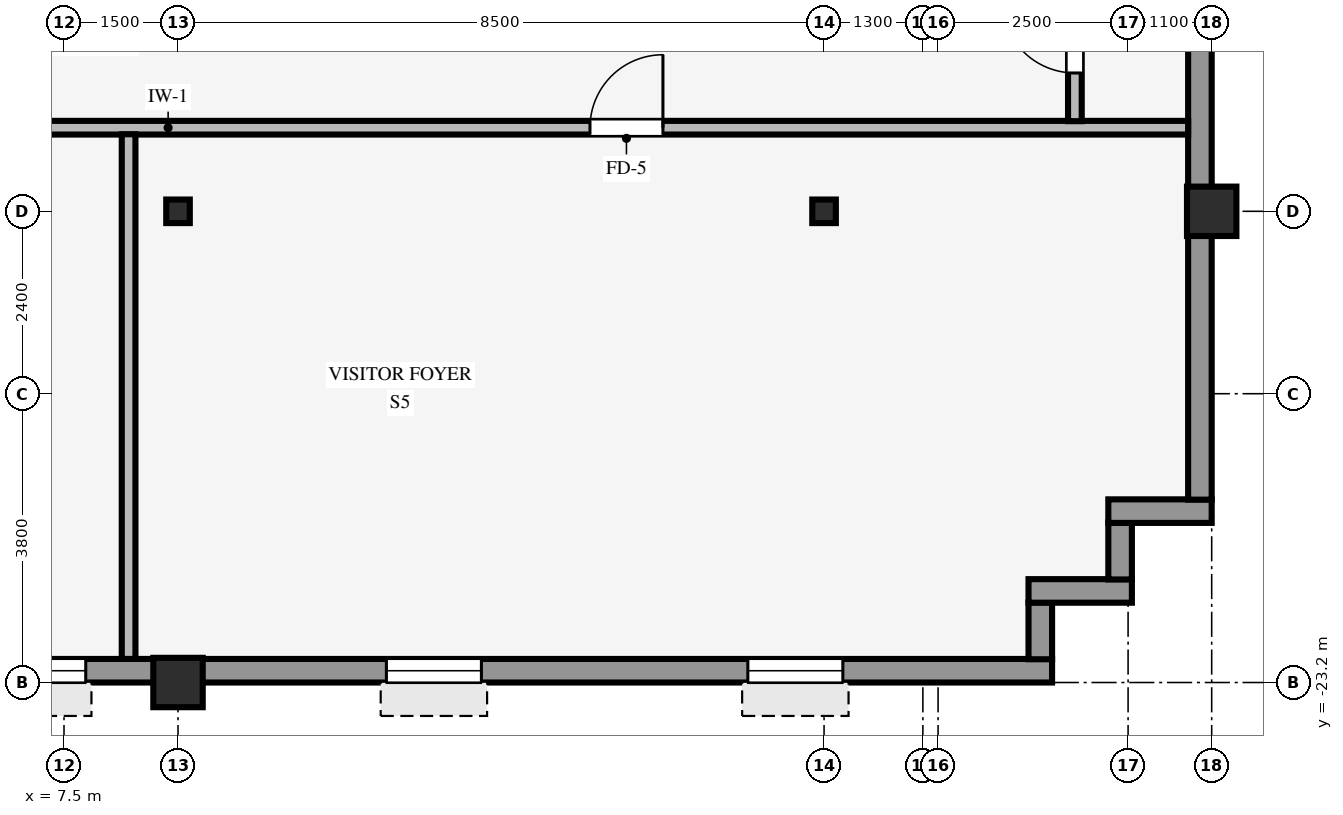
"""IFC4 building model, lengths in metres.
Left out: names, types, materials, properties, quantities, classifications, styles, units other than length and angle.
Written with IfcOpenShell. Run it as: python <this file> out.ifc"""

import sys

from ifc_helpers import new_model, si_unit, direction, frame, frame_2d, origin, origin_2d, place, context, subcontext, project, spatial, rectangle, hollow_rectangle, i_section, extrude, source, transform, mapped, element, fill, save


model = new_model("IFC4")
c1 = context("Model", 3, precision=1e-05, world=origin(), true_north=direction((0.0, 1.0)))
c2 = subcontext(c1, "Body", "Model", "MODEL_VIEW")
j1 = project(units=[si_unit("LENGTHUNIT", "METRE"), si_unit("PLANEANGLEUNIT", "RADIAN")], contexts=[c1])
p1 = place(None, origin())
s1 = spatial("IfcSite", under=j1, at=p1, CompositionType="ELEMENT")
p2 = place(p1, origin())
s2 = spatial("IfcBuilding", under=s1, at=p2, CompositionType="ELEMENT")
p3 = place(p2, frame((0.0, 0.0, 182.25)))
s3 = spatial("IfcBuildingStorey", under=s2, at=p3, CompositionType="ELEMENT", Elevation=182.25)
for number, where, z_axis, x_axis in (
    (1, (22.6, -17.0, 0.0), (0.0, 0.0, 1.0), (1.0, 0.0, 0.0)),
    (2, (9.0, -23.2, 0.0), (0.0, 0.0, 1.0), (1.0, 0.0, 0.0)),
):
    element("IfcColumn", number, at=place(p3, frame(where, z_axis=z_axis, x_axis=x_axis)), inside=s3, PredefinedType="COLUMN", context=c2, shape_type="SweptSolid", body=[
        extrude(hollow_rectangle(XDim=0.65, YDim=0.65, WallThickness=0.04, InnerFilletRadius=0.04, OuterFilletRadius=0.08, at=origin_2d()), origin(), (0.0, 0.0, 1.0), 3.25),
    ])
for number, where, z_axis, x_axis in (
    (3, (9.0, -17.0, 0.0), (0.0, 0.0, 1.0), (1.0, 0.0, 0.0)),
    (4, (17.5, -17.0, 0.0), (0.0, 0.0, 1.0), (1.0, 0.0, 0.0)),
):
    element("IfcColumn", number, at=place(p3, frame(where, z_axis=z_axis, x_axis=x_axis)), inside=s3, PredefinedType="COLUMN", context=c2, shape_type="SweptSolid", body=[
        extrude(i_section(OverallWidth=0.31, OverallDepth=0.31, WebThickness=0.015, FlangeThickness=0.015, FilletRadius=0.015, at=origin_2d()), origin(), (0.0, 0.0, 1.0), 3.25),
    ])
p4 = place(p3, frame((-24.3, -23.045, 0.0), z_axis=(0.0, 0.0, 1.0), x_axis=(1.0, 0.0, 0.0)))
e5 = element("IfcWall", 5, at=p4, inside=s3, PredefinedType="STANDARD", context=c2, shape_type="SweptSolid", body=[
    extrude(rectangle(XDim=44.8, YDim=0.31, at=frame_2d((22.4, 0.0))), origin(), (0.0, 0.0, 1.0), 2.585),
])
p5 = place(p4, frame((2.753, 0.0, 0.8)))
e6 = element("IfcOpeningElement", 6, at=p5, cuts=e5, PredefinedType="OPENING", context=c2, shape_type="SweptSolid", body=[
    extrude(rectangle(XDim=1.25, YDim=1.52, at=frame_2d((0.625, 0.76))), frame((0.0, 0.165, 0.0), z_axis=(0.0, -1.0, 0.0), x_axis=(1.0, 0.0, 0.0)), (0.0, 0.0, 1.0), 0.33),
])
p6 = place(p4, frame((7.508, 0.0, 0.8)))
e7 = element("IfcOpeningElement", 7, at=p6, cuts=e5, PredefinedType="OPENING", context=c2, shape_type="SweptSolid", body=[
    extrude(rectangle(XDim=1.25, YDim=1.52, at=frame_2d((0.625, 0.76))), frame((0.0, 0.165, 0.0), z_axis=(0.0, -1.0, 0.0), x_axis=(1.0, 0.0, 0.0)), (0.0, 0.0, 1.0), 0.33),
])
p7 = place(p4, frame((12.264, 0.0, 0.8)))
e8 = element("IfcOpeningElement", 8, at=p7, cuts=e5, PredefinedType="OPENING", context=c2, shape_type="SweptSolid", body=[
    extrude(rectangle(XDim=1.25, YDim=1.52, at=frame_2d((0.625, 0.76))), frame((0.0, 0.165, 0.0), z_axis=(0.0, -1.0, 0.0), x_axis=(1.0, 0.0, 0.0)), (0.0, 0.0, 1.0), 0.33),
])
p8 = place(p4, frame((17.019, 0.0, 0.8)))
e9 = element("IfcOpeningElement", 9, at=p8, cuts=e5, PredefinedType="OPENING", context=c2, shape_type="SweptSolid", body=[
    extrude(rectangle(XDim=1.25, YDim=1.52, at=frame_2d((0.625, 0.76))), frame((0.0, 0.165, 0.0), z_axis=(0.0, -1.0, 0.0), x_axis=(1.0, 0.0, 0.0)), (0.0, 0.0, 1.0), 0.33),
])
p9 = place(p4, frame((21.775, 0.0, 0.8)))
e10 = element("IfcOpeningElement", 10, at=p9, cuts=e5, PredefinedType="OPENING", context=c2, shape_type="SweptSolid", body=[
    extrude(rectangle(XDim=1.25, YDim=1.52, at=frame_2d((0.625, 0.76))), frame((0.0, 0.165, 0.0), z_axis=(0.0, -1.0, 0.0), x_axis=(1.0, 0.0, 0.0)), (0.0, 0.0, 1.0), 0.33),
])
p10 = place(p4, frame((26.531, 0.0, 0.8)))
e11 = element("IfcOpeningElement", 11, at=p10, cuts=e5, PredefinedType="OPENING", context=c2, shape_type="SweptSolid", body=[
    extrude(rectangle(XDim=1.25, YDim=1.52, at=frame_2d((0.625, 0.76))), frame((0.0, 0.165, 0.0), z_axis=(0.0, -1.0, 0.0), x_axis=(1.0, 0.0, 0.0)), (0.0, 0.0, 1.0), 0.33),
])
p11 = place(p4, frame((30.836, 0.0, 0.8)))
e12 = element("IfcOpeningElement", 12, at=p11, cuts=e5, PredefinedType="OPENING", context=c2, shape_type="SweptSolid", body=[
    extrude(rectangle(XDim=1.25, YDim=1.52, at=frame_2d((0.625, 0.76))), frame((0.0, 0.165, 0.0), z_axis=(0.0, -1.0, 0.0), x_axis=(1.0, 0.0, 0.0)), (0.0, 0.0, 1.0), 0.33),
])
p12 = place(p4, frame((36.042, 0.0, 0.8)))
e13 = element("IfcOpeningElement", 13, at=p12, cuts=e5, PredefinedType="OPENING", context=c2, shape_type="SweptSolid", body=[
    extrude(rectangle(XDim=1.25, YDim=1.52, at=frame_2d((0.625, 0.76))), frame((0.0, 0.165, 0.0), z_axis=(0.0, -1.0, 0.0), x_axis=(1.0, 0.0, 0.0)), (0.0, 0.0, 1.0), 0.33),
])
p13 = place(p4, frame((40.797, 0.0, 0.8)))
e14 = element("IfcOpeningElement", 14, at=p13, cuts=e5, PredefinedType="OPENING", context=c2, shape_type="SweptSolid", body=[
    extrude(rectangle(XDim=1.25, YDim=1.52, at=frame_2d((0.625, 0.76))), frame((0.0, 0.165, 0.0), z_axis=(0.0, -1.0, 0.0), x_axis=(1.0, 0.0, 0.0)), (0.0, 0.0, 1.0), 0.33),
])
p14 = place(p3, frame((20.345, -22.894, 0.0), z_axis=(0.0, 0.0, 1.0), x_axis=(0.0, 1.0, 0.0)))
e15 = element("IfcWall", 15, at=p14, inside=s3, PredefinedType="STANDARD", context=c2, shape_type="SweptSolid", body=[
    extrude(rectangle(XDim=0.748, YDim=0.31, at=frame_2d((0.374, 0.0))), origin(), (0.0, 0.0, 1.0), 3.24),
])
p15 = place(p3, frame((20.19, -21.995, 0.0), z_axis=(0.0, 0.0, 1.0), x_axis=(1.0, 0.0, 0.0)))
e16 = element("IfcWall", 16, at=p15, inside=s3, PredefinedType="STANDARD", context=c2, shape_type="SweptSolid", body=[
    extrude(rectangle(XDim=1.36, YDim=0.31, at=frame_2d((0.68, 0.0))), origin(), (0.0, 0.0, 1.0), 3.24),
])
p16 = place(p3, frame((21.395, -21.844, 0.0), z_axis=(0.0, 0.0, 1.0), x_axis=(0.0, 1.0, 0.0)))
e17 = element("IfcWall", 17, at=p16, inside=s3, PredefinedType="STANDARD", context=c2, shape_type="SweptSolid", body=[
    extrude(rectangle(XDim=0.748, YDim=0.31, at=frame_2d((0.374, 0.0))), origin(), (0.0, 0.0, 1.0), 3.24),
])
p17 = place(p3, frame((21.24, -20.945, 0.0), z_axis=(0.0, 0.0, 1.0), x_axis=(1.0, 0.0, 0.0)))
e18 = element("IfcWall", 18, at=p17, inside=s3, PredefinedType="STANDARD", context=c2, shape_type="SweptSolid", body=[
    extrude(rectangle(XDim=1.36, YDim=0.31, at=frame_2d((0.68, 0.0))), origin(), (0.0, 0.0, 1.0), 3.24),
])
p18 = place(p3, frame((22.445, -20.794, 0.0), z_axis=(0.0, 0.0, 1.0), x_axis=(0.0, 1.0, 0.0)))
e19 = element("IfcWall", 19, at=p18, inside=s3, PredefinedType="STANDARD", context=c2, shape_type="SweptSolid", body=[
    extrude(rectangle(XDim=37.788, YDim=0.31, at=frame_2d((18.894, 0.0))), origin(), (0.0, 0.0, 1.0), 2.585),
])
p19 = place(p18, frame((16.444, 0.0, 0.0), z_axis=(0.0, 0.0, 1.0), x_axis=(-1.0, 0.0, 0.0)))
e20 = element("IfcOpeningElement", 20, at=p19, cuts=e19, PredefinedType="OPENING", context=c2, shape_type="SweptSolid", body=[
    extrude(rectangle(XDim=1.05, YDim=2.1, at=frame_2d((0.525, 1.05))), frame((0.0, 0.165, 0.0), z_axis=(0.0, -1.0, 0.0), x_axis=(1.0, 0.0, 0.0)), (0.0, 0.0, 1.0), 0.33),
])
p20 = place(p18, frame((7.644, 0.0, 0.8)))
e21 = element("IfcOpeningElement", 21, at=p20, cuts=e19, PredefinedType="OPENING", context=c2, shape_type="SweptSolid", body=[
    extrude(rectangle(XDim=2.05, YDim=1.52, at=frame_2d((1.025, 0.76))), frame((0.0, 0.165, 0.0), z_axis=(0.0, -1.0, 0.0), x_axis=(1.0, 0.0, 0.0)), (0.0, 0.0, 1.0), 0.33),
])
p21 = place(p18, frame((12.756, 0.0, 0.8)))
e22 = element("IfcOpeningElement", 22, at=p21, cuts=e19, PredefinedType="OPENING", context=c2, shape_type="SweptSolid", body=[
    extrude(rectangle(XDim=2.05, YDim=1.52, at=frame_2d((1.025, 0.76))), frame((0.0, 0.165, 0.0), z_axis=(0.0, -1.0, 0.0), x_axis=(1.0, 0.0, 0.0)), (0.0, 0.0, 1.0), 0.33),
])
p22 = place(p18, frame((17.869, 0.0, 0.8)))
e23 = element("IfcOpeningElement", 23, at=p22, cuts=e19, PredefinedType="OPENING", context=c2, shape_type="SweptSolid", body=[
    extrude(rectangle(XDim=2.05, YDim=1.52, at=frame_2d((1.025, 0.76))), frame((0.0, 0.165, 0.0), z_axis=(0.0, -1.0, 0.0), x_axis=(1.0, 0.0, 0.0)), (0.0, 0.0, 1.0), 0.33),
])
p23 = place(p18, frame((22.982, 0.0, 0.8)))
e24 = element("IfcOpeningElement", 24, at=p23, cuts=e19, PredefinedType="OPENING", context=c2, shape_type="SweptSolid", body=[
    extrude(rectangle(XDim=2.05, YDim=1.52, at=frame_2d((1.025, 0.76))), frame((0.0, 0.165, 0.0), z_axis=(0.0, -1.0, 0.0), x_axis=(1.0, 0.0, 0.0)), (0.0, 0.0, 1.0), 0.33),
])
p24 = place(p18, frame((27.194, 0.0, 0.8)))
e25 = element("IfcOpeningElement", 25, at=p24, cuts=e19, PredefinedType="OPENING", context=c2, shape_type="SweptSolid", body=[
    extrude(rectangle(XDim=2.05, YDim=1.52, at=frame_2d((1.025, 0.76))), frame((0.0, 0.165, 0.0), z_axis=(0.0, -1.0, 0.0), x_axis=(1.0, 0.0, 0.0)), (0.0, 0.0, 1.0), 0.33),
])
p25 = place(p18, frame((33.207, 0.0, 0.8)))
e26 = element("IfcOpeningElement", 26, at=p25, cuts=e19, PredefinedType="OPENING", context=c2, shape_type="SweptSolid", body=[
    extrude(rectangle(XDim=2.05, YDim=1.52, at=frame_2d((1.025, 0.76))), frame((0.0, 0.165, 0.0), z_axis=(0.0, -1.0, 0.0), x_axis=(1.0, 0.0, 0.0)), (0.0, 0.0, 1.0), 0.33),
])
p26 = place(p3, frame((-26.09, -15.9, 0.0), z_axis=(0.0, 0.0, 1.0), x_axis=(1.0, 0.0, 0.0)))
e27 = element("IfcWall", 27, at=p26, inside=s3, PredefinedType="PARTITIONING", context=c2, shape_type="SweptSolid", body=[
    extrude(rectangle(XDim=48.38, YDim=0.18, at=frame_2d((24.19, 0.0))), origin(), (0.0, 0.0, 1.0), 3.24),
])
p27 = place(p26, frame((40.51, 0.0, 0.0)))
e28 = element("IfcOpeningElement", 28, at=p27, cuts=e27, PredefinedType="OPENING", context=c2, shape_type="SweptSolid", body=[
    extrude(rectangle(XDim=0.96, YDim=2.1, at=frame_2d((0.48, 1.05))), frame((0.0, 0.1, 0.0), z_axis=(0.0, -1.0, 0.0), x_axis=(1.0, 0.0, 0.0)), (0.0, 0.0, 1.0), 0.2),
])
p28 = place(p26, frame((19.995, 0.0, 0.0)))
e29 = element("IfcOpeningElement", 29, at=p28, cuts=e27, PredefinedType="OPENING", context=c2, shape_type="SweptSolid", body=[
    extrude(rectangle(XDim=0.96, YDim=2.1, at=frame_2d((0.48, 1.05))), frame((0.0, 0.1, 0.0), z_axis=(0.0, -1.0, 0.0), x_axis=(1.0, 0.0, 0.0)), (0.0, 0.0, 1.0), 0.2),
])
p29 = place(p26, frame((28.45, 0.0, 0.0)))
e30 = element("IfcOpeningElement", 30, at=p29, cuts=e27, PredefinedType="OPENING", context=c2, shape_type="SweptSolid", body=[
    extrude(rectangle(XDim=0.96, YDim=2.1, at=frame_2d((0.48, 1.05))), frame((0.0, 0.1, 0.0), z_axis=(0.0, -1.0, 0.0), x_axis=(1.0, 0.0, 0.0)), (0.0, 0.0, 1.0), 0.2),
])
p30 = place(p26, frame((11.605, 0.0, 0.0)))
e31 = element("IfcOpeningElement", 31, at=p30, cuts=e27, PredefinedType="OPENING", context=c2, shape_type="SweptSolid", body=[
    extrude(rectangle(XDim=0.96, YDim=2.1, at=frame_2d((0.48, 1.05))), frame((0.0, 0.1, 0.0), z_axis=(0.0, -1.0, 0.0), x_axis=(1.0, 0.0, 0.0)), (0.0, 0.0, 1.0), 0.2),
])
p31 = place(p26, frame((2.465, 0.0, 0.0)))
e32 = element("IfcOpeningElement", 32, at=p31, cuts=e27, PredefinedType="OPENING", context=c2, shape_type="SweptSolid", body=[
    extrude(rectangle(XDim=0.96, YDim=2.1, at=frame_2d((0.48, 1.05))), frame((0.0, 0.1, 0.0), z_axis=(0.0, -1.0, 0.0), x_axis=(1.0, 0.0, 0.0)), (0.0, 0.0, 1.0), 0.2),
])
p32 = place(p3, frame((8.35, -22.89, 0.0), z_axis=(0.0, 0.0, 1.0), x_axis=(0.0, 1.0, 0.0)))
e33 = element("IfcWall", 33, at=p32, inside=s3, PredefinedType="PARTITIONING", context=c2, shape_type="SweptSolid", body=[
    extrude(rectangle(XDim=6.904, YDim=0.18, at=frame_2d((3.452, 0.0))), origin(), (0.0, 0.0, 1.0), 3.24),
])
p33 = place(p3, frame((20.8, -15.814, 0.0), z_axis=(0.0, 0.0, 1.0), x_axis=(0.0, 1.0, 0.0)))
e34 = element("IfcWall", 34, at=p33, inside=s3, PredefinedType="PARTITIONING", context=c2, shape_type="SweptSolid", body=[
    extrude(rectangle(XDim=2.228, YDim=0.18, at=frame_2d((1.114, 0.0))), origin(), (0.0, 0.0, 1.0), 3.24),
])
p34 = place(p33, frame((0.634, 0.0, 0.0)))
e35 = element("IfcOpeningElement", 35, at=p34, cuts=e34, PredefinedType="OPENING", context=c2, shape_type="SweptSolid", body=[
    extrude(rectangle(XDim=0.96, YDim=2.1, at=frame_2d((0.48, 1.05))), frame((0.0, 0.1, 0.0), z_axis=(0.0, -1.0, 0.0), x_axis=(1.0, 0.0, 0.0)), (0.0, 0.0, 1.0), 0.2),
])
m1 = source(origin(), c2, "Body", "SweptSolid", [
    extrude(rectangle(XDim=1.25, YDim=1.52, at=frame_2d((0.625, 0.76))), frame((0.0, 0.03, 0.0), z_axis=(0.0, -1.0, 0.0), x_axis=(1.0, 0.0, 0.0)), (0.0, 0.0, 1.0), 0.06),
])
p35 = place(p11, origin())
e36 = element("IfcWindow", 36, at=p35, inside=s3, PartitioningType="SINGLE_PANEL", PredefinedType="WINDOW", context=c2, shape_type="MappedRepresentation", body=[
    mapped(m1, transform((0.0, 0.0, 0.0), scale=1.0)),
])
fill(e12, e36)
p36 = place(p12, origin())
e37 = element("IfcWindow", 37, at=p36, inside=s3, PartitioningType="SINGLE_PANEL", PredefinedType="WINDOW", context=c2, shape_type="MappedRepresentation", body=[
    mapped(m1, transform((0.0, 0.0, 0.0), scale=1.0)),
])
fill(e13, e37)
p37 = place(p13, origin())
e38 = element("IfcWindow", 38, at=p37, inside=s3, PartitioningType="SINGLE_PANEL", PredefinedType="WINDOW", context=c2, shape_type="MappedRepresentation", body=[
    mapped(m1, transform((0.0, 0.0, 0.0), scale=1.0)),
])
fill(e14, e38)
m2 = source(origin(), c2, "Body", "SweptSolid", [
    extrude(rectangle(XDim=0.96, YDim=2.1, at=frame_2d((0.48, 1.05))), frame((0.0, 0.025, 0.0), z_axis=(0.0, -1.0, 0.0), x_axis=(1.0, 0.0, 0.0)), (0.0, 0.0, 1.0), 0.05),
])
p38 = place(p27, origin())
e39 = element("IfcDoor", 39, at=p38, inside=s3, OperationType="SINGLE_SWING_RIGHT", PredefinedType="DOOR", context=c2, shape_type="MappedRepresentation", body=[
    mapped(m2, transform((0.0, 0.0, 0.0), scale=1.0)),
])
fill(e28, e39)
p39 = place(p34, origin())
e40 = element("IfcDoor", 40, at=p39, inside=s3, OperationType="SINGLE_SWING_RIGHT", PredefinedType="DOOR", context=c2, shape_type="MappedRepresentation", body=[
    mapped(m2, transform((0.0, 0.0, 0.0), scale=1.0)),
])
fill(e35, e40)
save(model, sys.argv[1])
